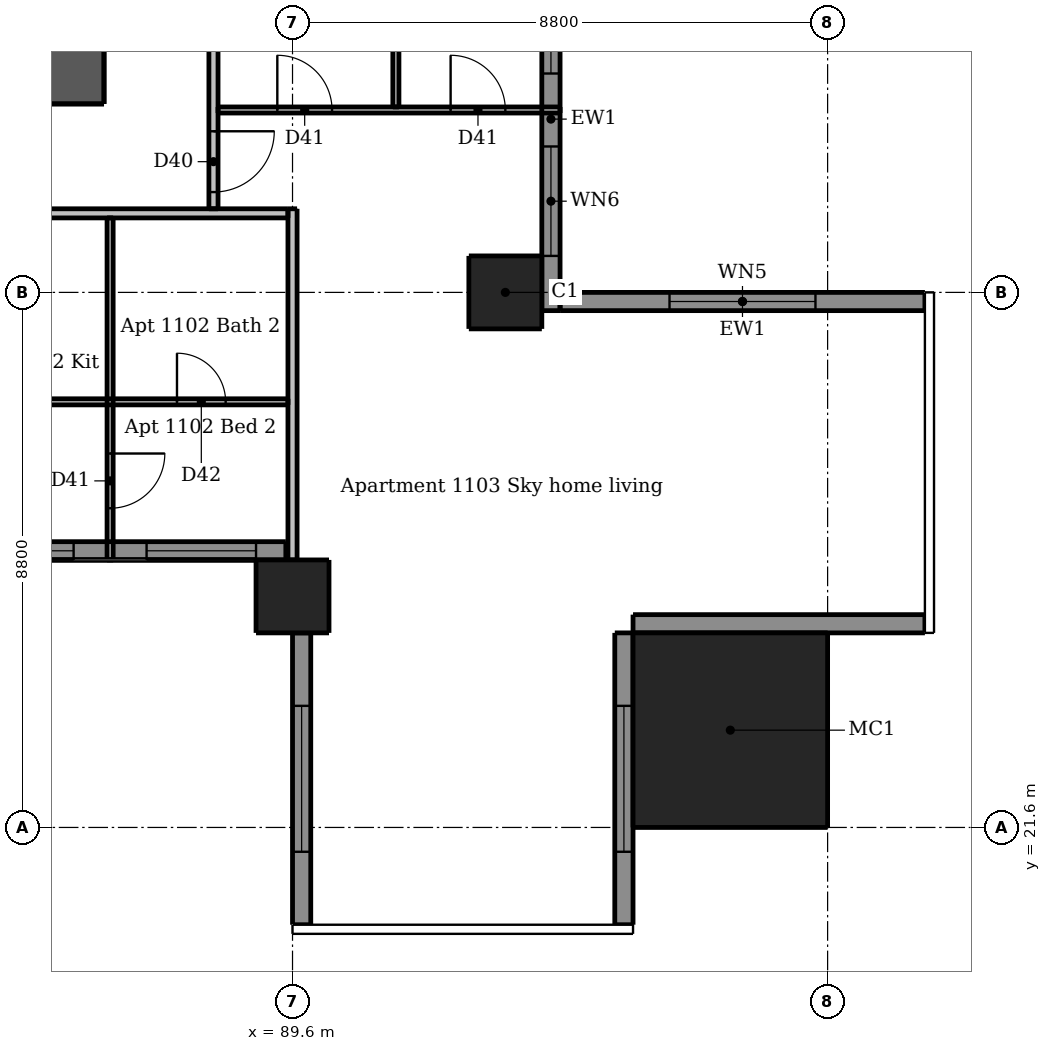
"""IFC4 building model, lengths in metres.
Left out: names, types, materials, properties, quantities, classifications, styles, units other than length and angle.
Written with IfcOpenShell. Run it as: python <this file> out.ifc"""

import sys

from ifc_helpers import new_model, si_unit, direction, frame, frame_2d, origin, origin_2d, place, context, subcontext, project, spatial, rectangle, extrude, element, fill, save


model = new_model("IFC4")
c1 = context("Model", 3, precision=1e-05, world=origin(), true_north=direction((0.0, 1.0)))
c2 = subcontext(c1, "Body", "Model", "MODEL_VIEW")
j1 = project(units=[si_unit("LENGTHUNIT", "METRE"), si_unit("PLANEANGLEUNIT", "RADIAN")], contexts=[c1])
p1 = place(None, origin())
s1 = spatial("IfcSite", under=j1, at=p1, CompositionType="ELEMENT")
p2 = place(p1, origin())
s2 = spatial("IfcBuilding", under=s1, at=p2, CompositionType="ELEMENT")
p3 = place(p2, frame((0.0, 0.0, 43.3)))
s3 = spatial("IfcBuildingStorey", under=s2, at=p3, CompositionType="ELEMENT", Elevation=43.3)
p4 = place(p3, frame((62.5, 33.95, 0.0), z_axis=(0.0, 0.0, 1.0), x_axis=(1.0, 0.0, 0.0)))
e1 = element("IfcWall", 1, at=p4, inside=s3, PredefinedType="SHEAR", context=c2, shape_type="SweptSolid", body=[
    extrude(rectangle(XDim=24.0, YDim=0.9, at=frame_2d((12.0, 0.0))), origin(), (0.0, 0.0, 1.0), 3.05),
])
p5 = place(p4, frame((2.05, 0.0, 0.0)))
e2 = element("IfcOpeningElement", 2, at=p5, cuts=e1, PredefinedType="OPENING", context=c2, shape_type="SweptSolid", body=[
    extrude(rectangle(XDim=1.1, YDim=2.1, at=frame_2d((0.55, 1.05))), frame((0.0, 0.46, 0.0), z_axis=(0.0, -1.0, 0.0), x_axis=(1.0, 0.0, 0.0)), (0.0, 0.0, 1.0), 0.92),
])
p6 = place(p4, frame((20.85, 0.0, 0.0)))
e3 = element("IfcOpeningElement", 3, at=p6, cuts=e1, PredefinedType="OPENING", context=c2, shape_type="SweptSolid", body=[
    extrude(rectangle(XDim=1.1, YDim=2.1, at=frame_2d((0.55, 1.05))), frame((0.0, 0.46, 0.0), z_axis=(0.0, -1.0, 0.0), x_axis=(1.0, 0.0, 0.0)), (0.0, 0.0, 1.0), 0.92),
])
p7 = place(p4, frame((8.0, 0.0, 0.0)))
e4 = element("IfcOpeningElement", 4, at=p7, cuts=e1, PredefinedType="OPENING", context=c2, shape_type="SweptSolid", body=[
    extrude(rectangle(XDim=1.1, YDim=2.1, at=frame_2d((0.55, 1.05))), frame((0.0, 0.46, 0.0), z_axis=(0.0, -1.0, 0.0), x_axis=(1.0, 0.0, 0.0)), (0.0, 0.0, 1.0), 0.92),
])
p8 = place(p4, frame((17.488, 0.0, 0.0)))
e5 = element("IfcOpeningElement", 5, at=p8, cuts=e1, PredefinedType="OPENING", context=c2, shape_type="SweptSolid", body=[
    extrude(rectangle(XDim=0.9, YDim=2.1, at=frame_2d((0.45, 1.05))), frame((0.0, 0.46, 0.0), z_axis=(0.0, -1.0, 0.0), x_axis=(1.0, 0.0, 0.0)), (0.0, 0.0, 1.0), 0.92),
])
p9 = place(p3, frame((86.05, 33.5, 0.0), z_axis=(0.0, 0.0, 1.0), x_axis=(0.0, 1.0, 0.0)))
e6 = element("IfcWall", 6, at=p9, inside=s3, PredefinedType="SHEAR", context=c2, shape_type="SweptSolid", body=[
    extrude(rectangle(XDim=24.0, YDim=0.9, at=frame_2d((12.0, 0.0))), origin(), (0.0, 0.0, 1.0), 3.05),
])
p10 = place(p9, frame((11.2, 0.0, 0.0)))
e7 = element("IfcOpeningElement", 7, at=p10, cuts=e6, PredefinedType="OPENING", context=c2, shape_type="SweptSolid", body=[
    extrude(rectangle(XDim=1.6, YDim=2.1, at=frame_2d((0.8, 1.05))), frame((0.0, 0.46, 0.0), z_axis=(0.0, -1.0, 0.0), x_axis=(1.0, 0.0, 0.0)), (0.0, 0.0, 1.0), 0.92),
])
for number, where, z_axis, x_axis in (
    (8, (89.6, 25.4, 0.0), (0.0, 0.0, 1.0), (1.0, 0.0, 0.0)),
    (9, (93.1, 30.4, 0.0), (0.0, 0.0, 1.0), (1.0, 0.0, 0.0)),
):
    element("IfcColumn", number, at=place(p3, frame(where, z_axis=z_axis, x_axis=x_axis)), inside=s3, PredefinedType="COLUMN", context=c2, shape_type="SweptSolid", body=[
        extrude(rectangle(XDim=1.2, YDim=1.2, at=origin_2d()), origin(), (0.0, 0.0, 1.0), 3.05),
    ])
p11 = place(p3, frame((96.8, 23.2, 0.0), z_axis=(0.0, 0.0, 1.0), x_axis=(1.0, 0.0, 0.0)))
e10 = element("IfcColumn", 10, at=p11, inside=s3, PredefinedType="COLUMN", context=c2, shape_type="SweptSolid", body=[
    extrude(rectangle(XDim=3.2, YDim=3.2, at=origin_2d()), origin(), (0.0, 0.0, 1.0), 3.3),
])
p12 = place(p3, frame((89.75, 24.8, 0.0), z_axis=(0.0, 0.0, 1.0), x_axis=(0.0, -1.0, 0.0)))
e11 = element("IfcWall", 11, at=p12, inside=s3, PredefinedType="SOLIDWALL", context=c2, shape_type="SweptSolid", body=[
    extrude(rectangle(XDim=4.8, YDim=0.3, at=frame_2d((2.4, 0.0))), origin(), (0.0, 0.0, 1.0), 3.05),
])
p13 = place(p12, frame((1.2, 0.0, 0.15)))
e12 = element("IfcOpeningElement", 12, at=p13, cuts=e11, PredefinedType="OPENING", context=c2, shape_type="SweptSolid", body=[
    extrude(rectangle(XDim=2.4, YDim=2.1, at=frame_2d((1.2, 1.05))), frame((0.0, 0.16, 0.0), z_axis=(0.0, -1.0, 0.0), x_axis=(1.0, 0.0, 0.0)), (0.0, 0.0, 1.0), 0.32),
])
p14 = place(p3, frame((95.05, 20.0, 0.0), z_axis=(0.0, 0.0, 1.0), x_axis=(0.0, 1.0, 0.0)))
e13 = element("IfcWall", 13, at=p14, inside=s3, PredefinedType="SOLIDWALL", context=c2, shape_type="SweptSolid", body=[
    extrude(rectangle(XDim=4.8, YDim=0.3, at=frame_2d((2.4, 0.0))), origin(), (0.0, 0.0, 1.0), 3.05),
])
p15 = place(p14, frame((1.2, 0.0, 0.15)))
e14 = element("IfcOpeningElement", 14, at=p15, cuts=e13, PredefinedType="OPENING", context=c2, shape_type="SweptSolid", body=[
    extrude(rectangle(XDim=2.4, YDim=2.1, at=frame_2d((1.2, 1.05))), frame((0.0, 0.16, 0.0), z_axis=(0.0, -1.0, 0.0), x_axis=(1.0, 0.0, 0.0)), (0.0, 0.0, 1.0), 0.32),
])
p16 = place(p3, frame((95.2, 24.95, 0.0), z_axis=(0.0, 0.0, 1.0), x_axis=(1.0, 0.0, 0.0)))
e15 = element("IfcWall", 15, at=p16, inside=s3, PredefinedType="SOLIDWALL", context=c2, shape_type="SweptSolid", body=[
    extrude(rectangle(XDim=4.8, YDim=0.3, at=frame_2d((2.4, 0.0))), origin(), (0.0, 0.0, 1.0), 3.05),
])
p17 = place(p3, frame((100.0, 30.25, 0.0), z_axis=(0.0, 0.0, 1.0), x_axis=(-1.0, 0.0, 0.0)))
e16 = element("IfcWall", 16, at=p17, inside=s3, PredefinedType="SOLIDWALL", context=c2, shape_type="SweptSolid", body=[
    extrude(rectangle(XDim=6.0, YDim=0.3, at=frame_2d((3.0, 0.0))), origin(), (0.0, 0.0, 1.0), 3.05),
])
p18 = place(p17, frame((1.8, 0.0, 0.15)))
e17 = element("IfcOpeningElement", 17, at=p18, cuts=e16, PredefinedType="OPENING", context=c2, shape_type="SweptSolid", body=[
    extrude(rectangle(XDim=2.4, YDim=2.1, at=frame_2d((1.2, 1.05))), frame((0.0, 0.16, 0.0), z_axis=(0.0, -1.0, 0.0), x_axis=(1.0, 0.0, 0.0)), (0.0, 0.0, 1.0), 0.32),
])
p19 = place(p3, frame((83.6, 26.15, 0.0), z_axis=(0.0, 0.0, 1.0), x_axis=(1.0, 0.0, 0.0)))
e18 = element("IfcWall", 18, at=p19, inside=s3, PredefinedType="SOLIDWALL", context=c2, shape_type="SweptSolid", body=[
    extrude(rectangle(XDim=5.89, YDim=0.3, at=frame_2d((2.945, 0.0))), origin(), (0.0, 0.0, 1.0), 3.05),
])
p20 = place(p19, frame((0.6, 0.0, 0.15)))
e19 = element("IfcOpeningElement", 19, at=p20, cuts=e18, PredefinedType="OPENING", context=c2, shape_type="SweptSolid", body=[
    extrude(rectangle(XDim=1.8, YDim=2.1, at=frame_2d((0.9, 1.05))), frame((0.0, 0.16, 0.0), z_axis=(0.0, -1.0, 0.0), x_axis=(1.0, 0.0, 0.0)), (0.0, 0.0, 1.0), 0.32),
])
p21 = place(p19, frame((3.6, 0.0, 0.15)))
e20 = element("IfcOpeningElement", 20, at=p21, cuts=e18, PredefinedType="OPENING", context=c2, shape_type="SweptSolid", body=[
    extrude(rectangle(XDim=1.8, YDim=2.1, at=frame_2d((0.9, 1.05))), frame((0.0, 0.16, 0.0), z_axis=(0.0, -1.0, 0.0), x_axis=(1.0, 0.0, 0.0)), (0.0, 0.0, 1.0), 0.32),
])
p22 = place(p3, frame((93.85, 30.1, 0.0), z_axis=(0.0, 0.0, 1.0), x_axis=(0.0, 1.0, 0.0)))
e21 = element("IfcWall", 21, at=p22, inside=s3, PredefinedType="SOLIDWALL", context=c2, shape_type="SweptSolid", body=[
    extrude(rectangle(XDim=6.3, YDim=0.3, at=frame_2d((3.15, 0.0))), origin(), (0.0, 0.0, 1.0), 3.05),
])
p23 = place(p22, frame((0.9, 0.0, 0.15)))
e22 = element("IfcOpeningElement", 22, at=p23, cuts=e21, PredefinedType="OPENING", context=c2, shape_type="SweptSolid", body=[
    extrude(rectangle(XDim=1.8, YDim=2.1, at=frame_2d((0.9, 1.05))), frame((0.0, 0.16, 0.0), z_axis=(0.0, -1.0, 0.0), x_axis=(1.0, 0.0, 0.0)), (0.0, 0.0, 1.0), 0.32),
])
p24 = place(p22, frame((3.9, 0.0, 0.15)))
e23 = element("IfcOpeningElement", 23, at=p24, cuts=e21, PredefinedType="OPENING", context=c2, shape_type="SweptSolid", body=[
    extrude(rectangle(XDim=1.8, YDim=2.1, at=frame_2d((0.9, 1.05))), frame((0.0, 0.16, 0.0), z_axis=(0.0, -1.0, 0.0), x_axis=(1.0, 0.0, 0.0)), (0.0, 0.0, 1.0), 0.32),
])
p25 = place(p3, frame((86.6, 31.625, 0.0), z_axis=(0.0, 0.0, 1.0), x_axis=(0.0, -1.0, 0.0)))
e24 = element("IfcWall", 24, at=p25, inside=s3, PredefinedType="PARTITIONING", context=c2, shape_type="SweptSolid", body=[
    extrude(rectangle(XDim=5.625, YDim=0.1, at=frame_2d((2.812, 0.0))), origin(), (0.0, 0.0, 1.0), 3.05),
])
p26 = place(p25, frame((3.875, 0.0, 0.0)))
e25 = element("IfcOpeningElement", 25, at=p26, cuts=e24, PredefinedType="OPENING", context=c2, shape_type="SweptSolid", body=[
    extrude(rectangle(XDim=0.9, YDim=2.1, at=frame_2d((0.45, 1.05))), frame((0.0, 0.06, 0.0), z_axis=(0.0, -1.0, 0.0), x_axis=(1.0, 0.0, 0.0)), (0.0, 0.0, 1.0), 0.12),
])
p27 = place(p3, frame((91.3, 33.45, 0.0), z_axis=(0.0, 0.0, 1.0), x_axis=(0.0, 1.0, 0.0)))
e26 = element("IfcWall", 26, at=p27, inside=s3, PredefinedType="PARTITIONING", context=c2, shape_type="SweptSolid", body=[
    extrude(rectangle(XDim=5.975, YDim=0.1, at=frame_2d((2.988, 0.0))), origin(), (0.0, 0.0, 1.0), 3.05),
])
p28 = place(p27, frame((3.8, 0.0, 0.0)))
e27 = element("IfcOpeningElement", 27, at=p28, cuts=e26, PredefinedType="OPENING", context=c2, shape_type="SweptSolid", body=[
    extrude(rectangle(XDim=0.8, YDim=2.1, at=frame_2d((0.4, 1.05))), frame((0.0, 0.06, 0.0), z_axis=(0.0, -1.0, 0.0), x_axis=(1.0, 0.0, 0.0)), (0.0, 0.0, 1.0), 0.12),
])
p29 = place(p3, frame((88.375, 33.4, 0.0), z_axis=(0.0, 0.0, 1.0), x_axis=(1.0, 0.0, 0.0)))
e28 = element("IfcWall", 28, at=p29, inside=s3, PredefinedType="PARTITIONING", context=c2, shape_type="SweptSolid", body=[
    extrude(rectangle(XDim=5.625, YDim=0.1, at=frame_2d((2.812, 0.0))), origin(), (0.0, 0.0, 1.0), 3.05),
])
p30 = place(p29, frame((0.975, 0.0, 0.0)))
e29 = element("IfcOpeningElement", 29, at=p30, cuts=e28, PredefinedType="OPENING", context=c2, shape_type="SweptSolid", body=[
    extrude(rectangle(XDim=0.9, YDim=2.1, at=frame_2d((0.45, 1.05))), frame((0.0, 0.06, 0.0), z_axis=(0.0, -1.0, 0.0), x_axis=(1.0, 0.0, 0.0)), (0.0, 0.0, 1.0), 0.12),
])
p31 = place(p29, frame((3.825, 0.0, 0.0)))
e30 = element("IfcOpeningElement", 30, at=p31, cuts=e28, PredefinedType="OPENING", context=c2, shape_type="SweptSolid", body=[
    extrude(rectangle(XDim=0.9, YDim=2.1, at=frame_2d((0.45, 1.05))), frame((0.0, 0.06, 0.0), z_axis=(0.0, -1.0, 0.0), x_axis=(1.0, 0.0, 0.0)), (0.0, 0.0, 1.0), 0.12),
])
p32 = place(p3, frame((84.25, 28.6, 0.0), z_axis=(0.0, 0.0, 1.0), x_axis=(1.0, 0.0, 0.0)))
e31 = element("IfcWall", 31, at=p32, inside=s3, PredefinedType="PARTITIONING", context=c2, shape_type="SweptSolid", body=[
    extrude(rectangle(XDim=5.275, YDim=0.1, at=frame_2d((2.637, 0.0))), origin(), (0.0, 0.0, 1.0), 3.05),
])
p33 = place(p32, frame((3.45, 0.0, 0.0)))
e32 = element("IfcOpeningElement", 32, at=p33, cuts=e31, PredefinedType="OPENING", context=c2, shape_type="SweptSolid", body=[
    extrude(rectangle(XDim=0.8, YDim=2.1, at=frame_2d((0.4, 1.05))), frame((0.0, 0.06, 0.0), z_axis=(0.0, -1.0, 0.0), x_axis=(1.0, 0.0, 0.0)), (0.0, 0.0, 1.0), 0.12),
])
p34 = place(p3, frame((88.3, 60.475, 0.0), z_axis=(0.0, 0.0, 1.0), x_axis=(0.0, -1.0, 0.0)))
e33 = element("IfcWall", 33, at=p34, inside=s3, PredefinedType="PARTITIONING", context=c2, shape_type="SweptSolid", body=[
    extrude(rectangle(XDim=28.7, YDim=0.15, at=frame_2d((14.35, 0.0))), origin(), (0.0, 0.0, 1.0), 3.05),
])
p35 = place(p34, frame((27.425, 0.0, 0.0)))
e34 = element("IfcOpeningElement", 34, at=p35, cuts=e33, PredefinedType="OPENING", context=c2, shape_type="SweptSolid", body=[
    extrude(rectangle(XDim=1.0, YDim=2.1, at=frame_2d((0.5, 1.05))), frame((0.0, 0.085, 0.0), z_axis=(0.0, -1.0, 0.0), x_axis=(1.0, 0.0, 0.0)), (0.0, 0.0, 1.0), 0.17),
])
p36 = place(p34, frame((10.575, 0.0, 0.0)))
e35 = element("IfcOpeningElement", 35, at=p36, cuts=e33, PredefinedType="OPENING", context=c2, shape_type="SweptSolid", body=[
    extrude(rectangle(XDim=1.0, YDim=2.1, at=frame_2d((0.5, 1.05))), frame((0.0, 0.085, 0.0), z_axis=(0.0, -1.0, 0.0), x_axis=(1.0, 0.0, 0.0)), (0.0, 0.0, 1.0), 0.17),
])
p37 = place(p3, frame((89.6, 26.0, 0.0), z_axis=(0.0, 0.0, 1.0), x_axis=(0.0, 1.0, 0.0)))
e36 = element("IfcWall", 36, at=p37, inside=s3, PredefinedType="PARTITIONING", context=c2, shape_type="SweptSolid", body=[
    extrude(rectangle(XDim=5.775, YDim=0.15, at=frame_2d((2.887, 0.0))), origin(), (0.0, 0.0, 1.0), 2.516),
])
p38 = place(p3, frame((89.525, 31.7, 0.0), z_axis=(0.0, 0.0, 1.0), x_axis=(-1.0, 0.0, 0.0)))
e37 = element("IfcWall", 37, at=p38, inside=s3, PredefinedType="PARTITIONING", context=c2, shape_type="SweptSolid", body=[
    extrude(rectangle(XDim=28.75, YDim=0.15, at=frame_2d((14.375, 0.0))), origin(), (0.0, 0.0, 1.0), 3.05),
])
p39 = place(p38, frame((24.325, 0.0, 0.0)))
e38 = element("IfcOpeningElement", 38, at=p39, cuts=e37, PredefinedType="OPENING", context=c2, shape_type="SweptSolid", body=[
    extrude(rectangle(XDim=1.0, YDim=2.1, at=frame_2d((0.5, 1.05))), frame((0.0, 0.085, 0.0), z_axis=(0.0, -1.0, 0.0), x_axis=(1.0, 0.0, 0.0)), (0.0, 0.0, 1.0), 0.17),
])
p40 = place(p38, frame((6.575, 0.0, 0.0)))
e39 = element("IfcOpeningElement", 39, at=p40, cuts=e37, PredefinedType="OPENING", context=c2, shape_type="SweptSolid", body=[
    extrude(rectangle(XDim=1.0, YDim=2.1, at=frame_2d((0.5, 1.05))), frame((0.0, 0.085, 0.0), z_axis=(0.0, -1.0, 0.0), x_axis=(1.0, 0.0, 0.0)), (0.0, 0.0, 1.0), 0.17),
])
p41 = place(p13, origin())
e40 = element("IfcWindow", 40, at=p41, inside=s3, PartitioningType="DOUBLE_PANEL_VERTICAL", PredefinedType="WINDOW", context=c2, shape_type="SweptSolid", body=[
    extrude(rectangle(XDim=2.4, YDim=2.1, at=frame_2d((1.2, 1.05))), frame((0.0, 0.03, 0.0), z_axis=(0.0, -1.0, 0.0), x_axis=(1.0, 0.0, 0.0)), (0.0, 0.0, 1.0), 0.06),
])
fill(e12, e40)
p42 = place(p15, origin())
e41 = element("IfcWindow", 41, at=p42, inside=s3, PartitioningType="DOUBLE_PANEL_VERTICAL", PredefinedType="WINDOW", context=c2, shape_type="SweptSolid", body=[
    extrude(rectangle(XDim=2.4, YDim=2.1, at=frame_2d((1.2, 1.05))), frame((0.0, 0.03, 0.0), z_axis=(0.0, -1.0, 0.0), x_axis=(1.0, 0.0, 0.0)), (0.0, 0.0, 1.0), 0.06),
])
fill(e14, e41)
p43 = place(p18, origin())
e42 = element("IfcWindow", 42, at=p43, inside=s3, PartitioningType="DOUBLE_PANEL_VERTICAL", PredefinedType="WINDOW", context=c2, shape_type="SweptSolid", body=[
    extrude(rectangle(XDim=2.4, YDim=2.1, at=frame_2d((1.2, 1.05))), frame((0.0, 0.03, 0.0), z_axis=(0.0, -1.0, 0.0), x_axis=(1.0, 0.0, 0.0)), (0.0, 0.0, 1.0), 0.06),
])
fill(e17, e42)
p44 = place(p20, origin())
e43 = element("IfcWindow", 43, at=p44, inside=s3, PartitioningType="DOUBLE_PANEL_VERTICAL", PredefinedType="WINDOW", context=c2, shape_type="SweptSolid", body=[
    extrude(rectangle(XDim=1.8, YDim=2.1, at=frame_2d((0.9, 1.05))), frame((0.0, 0.03, 0.0), z_axis=(0.0, -1.0, 0.0), x_axis=(1.0, 0.0, 0.0)), (0.0, 0.0, 1.0), 0.06),
])
fill(e19, e43)
p45 = place(p21, origin())
e44 = element("IfcWindow", 44, at=p45, inside=s3, PartitioningType="DOUBLE_PANEL_VERTICAL", PredefinedType="WINDOW", context=c2, shape_type="SweptSolid", body=[
    extrude(rectangle(XDim=1.8, YDim=2.1, at=frame_2d((0.9, 1.05))), frame((0.0, 0.03, 0.0), z_axis=(0.0, -1.0, 0.0), x_axis=(1.0, 0.0, 0.0)), (0.0, 0.0, 1.0), 0.06),
])
fill(e20, e44)
p46 = place(p23, origin())
e45 = element("IfcWindow", 45, at=p46, inside=s3, PartitioningType="DOUBLE_PANEL_VERTICAL", PredefinedType="WINDOW", context=c2, shape_type="SweptSolid", body=[
    extrude(rectangle(XDim=1.8, YDim=2.1, at=frame_2d((0.9, 1.05))), frame((0.0, 0.03, 0.0), z_axis=(0.0, -1.0, 0.0), x_axis=(1.0, 0.0, 0.0)), (0.0, 0.0, 1.0), 0.06),
])
fill(e22, e45)
p47 = place(p24, origin())
e46 = element("IfcWindow", 46, at=p47, inside=s3, PartitioningType="DOUBLE_PANEL_VERTICAL", PredefinedType="WINDOW", context=c2, shape_type="SweptSolid", body=[
    extrude(rectangle(XDim=1.8, YDim=2.1, at=frame_2d((0.9, 1.05))), frame((0.0, 0.03, 0.0), z_axis=(0.0, -1.0, 0.0), x_axis=(1.0, 0.0, 0.0)), (0.0, 0.0, 1.0), 0.06),
])
fill(e23, e46)
p48 = place(p26, origin())
e47 = element("IfcDoor", 47, at=p48, inside=s3, OperationType="SINGLE_SWING_LEFT", PredefinedType="DOOR", context=c2, shape_type="SweptSolid", body=[
    extrude(rectangle(XDim=0.9, YDim=2.1, at=frame_2d((0.45, 1.05))), frame((0.0, 0.025, 0.0), z_axis=(0.0, -1.0, 0.0), x_axis=(1.0, 0.0, 0.0)), (0.0, 0.0, 1.0), 0.05),
])
fill(e25, e47)
p49 = place(p33, origin())
e48 = element("IfcDoor", 48, at=p49, inside=s3, OperationType="SINGLE_SWING_LEFT", PredefinedType="DOOR", context=c2, shape_type="SweptSolid", body=[
    extrude(rectangle(XDim=0.8, YDim=2.1, at=frame_2d((0.4, 1.05))), frame((0.0, 0.025, 0.0), z_axis=(0.0, -1.0, 0.0), x_axis=(1.0, 0.0, 0.0)), (0.0, 0.0, 1.0), 0.05),
])
fill(e32, e48)
p50 = place(p35, origin())
e49 = element("IfcDoor", 49, at=p50, inside=s3, OperationType="SINGLE_SWING_LEFT", PredefinedType="DOOR", context=c2, shape_type="SweptSolid", body=[
    extrude(rectangle(XDim=1.0, YDim=2.1, at=frame_2d((0.5, 1.05))), frame((0.0, 0.025, 0.0), z_axis=(0.0, -1.0, 0.0), x_axis=(1.0, 0.0, 0.0)), (0.0, 0.0, 1.0), 0.05),
])
fill(e34, e49)
p51 = place(p30, origin())
e50 = element("IfcDoor", 50, at=p51, inside=s3, OperationType="SINGLE_SWING_LEFT", PredefinedType="DOOR", context=c2, shape_type="SweptSolid", body=[
    extrude(rectangle(XDim=0.9, YDim=2.1, at=frame_2d((0.45, 1.05))), frame((0.0, 0.025, 0.0), z_axis=(0.0, -1.0, 0.0), x_axis=(1.0, 0.0, 0.0)), (0.0, 0.0, 1.0), 0.05),
])
fill(e29, e50)
p52 = place(p31, origin())
e51 = element("IfcDoor", 51, at=p52, inside=s3, OperationType="SINGLE_SWING_LEFT", PredefinedType="DOOR", context=c2, shape_type="SweptSolid", body=[
    extrude(rectangle(XDim=0.9, YDim=2.1, at=frame_2d((0.45, 1.05))), frame((0.0, 0.025, 0.0), z_axis=(0.0, -1.0, 0.0), x_axis=(1.0, 0.0, 0.0)), (0.0, 0.0, 1.0), 0.05),
])
fill(e30, e51)
save(model, sys.argv[1])
